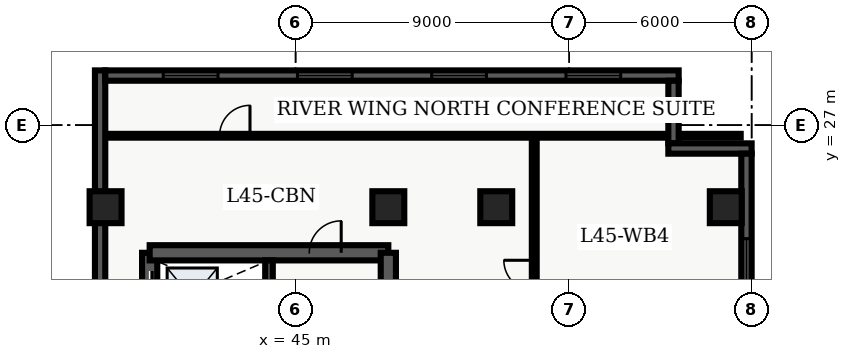
"""IFC4 building model, lengths in metres.
Left out: names, types, materials, properties, quantities, classifications, styles, units other than length and angle.
Written with IfcOpenShell. Run it as: python <this file> out.ifc"""

import sys

from ifc_helpers import new_model, entity, si_unit, converted_unit, direction, frame, origin_with_axes, origin_2d_with_axis, place, context, subcontext, project, spatial, polyline, rectangle, outline, extrude, element, fill, save


model = new_model("IFC4")
c1 = context("Model", 3, precision=1e-05, world=origin_with_axes(), true_north=direction((0.0, 1.0)))
c2 = subcontext(c1, "Body", "Model", "MODEL_VIEW")
j1 = project(units=[si_unit("LENGTHUNIT", "METRE"), converted_unit("PLANEANGLEUNIT", "DEGREE", entity("IfcPlaneAngleMeasure", 0.017), si_unit("PLANEANGLEUNIT", "RADIAN"), dimensions=[0, 0, 0, 0, 0, 0, 0])], contexts=[c1])
p1 = place(None, origin_with_axes())
s1 = spatial("IfcSite", under=j1, at=p1, CompositionType="ELEMENT")
p2 = place(p1, origin_with_axes())
s2 = spatial("IfcBuilding", under=s1, at=p2, CompositionType="ELEMENT")
p3 = place(p2, frame((0.0, 0.0, 183.6), z_axis=(0.0, 0.0, 1.0), x_axis=(1.0, 0.0, 0.0)))
s3 = spatial("IfcBuildingStorey", under=s2, at=p3, CompositionType="ELEMENT", Elevation=183.6)
p4 = place(p3, frame((40.2, 7.2, 0.0), z_axis=(0.0, 0.0, 1.0), x_axis=(0.0, 1.0, 0.0)))
e1 = element("IfcWall", 1, at=p4, inside=s3, PredefinedType="SHEAR", context=c2, shape_type="SweptSolid", body=[
    extrude(outline(polyline([(0.0, -0.25), (15.6, -0.25), (15.6, 0.25), (0.0, 0.25), (0.0, -0.25)])), origin_with_axes(), (0.0, 0.0, 1.0), 3.6),
])
p5 = place(p4, frame((14.475, 0.0, 0.0), z_axis=(0.0, 0.0, 1.0), x_axis=(1.0, 0.0, 0.0)))
e2 = element("IfcOpeningElement", 2, at=p5, cuts=e1, PredefinedType="OPENING", context=c2, shape_type="SweptSolid", body=[
    extrude(rectangle(XDim=1.05, YDim=0.52, at=origin_2d_with_axis()), origin_with_axes(), (0.0, 0.0, 1.0), 2.15),
])
p6 = place(p4, frame((12.75, 0.0, 0.0), z_axis=(0.0, 0.0, 1.0), x_axis=(1.0, 0.0, 0.0)))
e3 = element("IfcOpeningElement", 3, at=p6, cuts=e1, PredefinedType="OPENING", context=c2, shape_type="SweptSolid", body=[
    extrude(rectangle(XDim=1.2, YDim=0.52, at=origin_2d_with_axis()), origin_with_axes(), (0.0, 0.0, 1.0), 2.15),
])
p7 = place(p4, frame((9.3, 0.0, 0.0), z_axis=(0.0, 0.0, 1.0), x_axis=(1.0, 0.0, 0.0)))
e4 = element("IfcOpeningElement", 4, at=p7, cuts=e1, PredefinedType="OPENING", context=c2, shape_type="SweptSolid", body=[
    extrude(rectangle(XDim=0.9, YDim=0.52, at=origin_2d_with_axis()), origin_with_axes(), (0.0, 0.0, 1.0), 2.15),
])
p8 = place(p3, frame((40.2, 22.8, 0.0), z_axis=(0.0, 0.0, 1.0), x_axis=(1.0, 0.0, 0.0)))
e5 = element("IfcWall", 5, at=p8, inside=s3, PredefinedType="SHEAR", context=c2, shape_type="SweptSolid", body=[
    extrude(outline(polyline([(0.0, -0.25), (7.85, -0.25), (7.85, 0.25), (0.0, 0.25), (0.0, -0.25)])), origin_with_axes(), (0.0, 0.0, 1.0), 3.6),
])
p9 = place(p8, frame((5.775, 0.0, 0.0), z_axis=(0.0, 0.0, 1.0), x_axis=(1.0, 0.0, 0.0)))
e6 = element("IfcOpeningElement", 6, at=p9, cuts=e5, PredefinedType="OPENING", context=c2, shape_type="SweptSolid", body=[
    extrude(rectangle(XDim=1.05, YDim=0.52, at=origin_2d_with_axis()), origin_with_axes(), (0.0, 0.0, 1.0), 2.15),
])
p10 = place(p3, frame((48.05, 7.2, 0.0), z_axis=(0.0, 0.0, 1.0), x_axis=(0.0, 1.0, 0.0)))
e7 = element("IfcWall", 7, at=p10, inside=s3, PredefinedType="SHEAR", context=c2, shape_type="SweptSolid", body=[
    extrude(outline(polyline([(0.0, -0.25), (15.6, -0.25), (15.6, 0.25), (0.0, 0.25), (0.0, -0.25)])), origin_with_axes(), (0.0, 0.0, 1.0), 3.6),
])
p11 = place(p10, frame((5.975, 0.0, 0.0), z_axis=(0.0, 0.0, 1.0), x_axis=(1.0, 0.0, 0.0)))
e8 = element("IfcOpeningElement", 8, at=p11, cuts=e7, PredefinedType="OPENING", context=c2, shape_type="SweptSolid", body=[
    extrude(rectangle(XDim=1.05, YDim=0.52, at=origin_2d_with_axis()), origin_with_axes(), (0.0, 0.0, 1.0), 2.15),
])
p12 = place(p10, frame((2.725, 0.0, 0.0), z_axis=(0.0, 0.0, 1.0), x_axis=(1.0, 0.0, 0.0)))
e9 = element("IfcOpeningElement", 9, at=p12, cuts=e7, PredefinedType="OPENING", context=c2, shape_type="SweptSolid", body=[
    extrude(rectangle(XDim=0.95, YDim=0.52, at=origin_2d_with_axis()), origin_with_axes(), (0.0, 0.0, 1.0), 2.15),
])
p13 = place(p3, frame((44.125, 7.45, 0.0), z_axis=(0.0, 0.0, 1.0), x_axis=(0.0, 1.0, 0.0)))
e10 = element("IfcWall", 10, at=p13, inside=s3, PredefinedType="SHEAR", context=c2, shape_type="SweptSolid", body=[
    extrude(outline(polyline([(0.0, -0.125), (15.1, -0.125), (15.1, 0.125), (0.0, 0.125), (0.0, -0.125)])), origin_with_axes(), (0.0, 0.0, 1.0), 3.6),
])
for number, where, z_axis, x_axis in (
    (11, (38.75, 24.3, 0.0), (0.0, 0.0, 1.0), (1.0, 0.0, 0.0)),
    (12, (48.05, 24.3, 0.0), (0.0, 0.0, 1.0), (1.0, 0.0, 0.0)),
    (13, (51.6, 24.3, 0.0), (0.0, 0.0, 1.0), (1.0, 0.0, 0.0)),
    (14, (59.15, 24.3, 0.0), (0.0, 0.0, 1.0), (1.0, 0.0, 0.0)),
):
    element("IfcColumn", number, at=place(p3, frame(where, z_axis=z_axis, x_axis=x_axis)), inside=s3, PredefinedType="COLUMN", context=c2, shape_type="SweptSolid", body=[
        extrude(rectangle(XDim=1.05, YDim=1.05, at=origin_2d_with_axis()), origin_with_axes(), (0.0, 0.0, 1.0), 3.9),
    ])
p14 = place(p3, frame((52.85, 7.85, 0.0), z_axis=(0.0, 0.0, 1.0), x_axis=(0.0, 1.0, 0.0)))
e15 = element("IfcWall", 15, at=p14, inside=s3, PredefinedType="PARTITIONING", context=c2, shape_type="SweptSolid", body=[
    extrude(outline(polyline([(0.0, -0.08), (18.8, -0.08), (18.8, 0.08), (0.0, 0.08), (0.0, -0.08)])), origin_with_axes(), (0.0, 0.0, 1.0), 2.64),
])
p15 = place(p14, frame((0.684, 0.0, 0.0), z_axis=(0.0, 0.0, 1.0), x_axis=(1.0, 0.0, 0.0)))
e16 = element("IfcOpeningElement", 16, at=p15, cuts=e15, PredefinedType="OPENING", context=c2, shape_type="SweptSolid", body=[
    extrude(rectangle(XDim=0.9, YDim=0.18, at=origin_2d_with_axis()), origin_with_axes(), (0.0, 0.0, 1.0), 2.15),
])
p16 = place(p14, frame((5.907, 0.0, 0.0), z_axis=(0.0, 0.0, 1.0), x_axis=(1.0, 0.0, 0.0)))
e17 = element("IfcOpeningElement", 17, at=p16, cuts=e15, PredefinedType="OPENING", context=c2, shape_type="SweptSolid", body=[
    extrude(rectangle(XDim=1.0, YDim=0.18, at=origin_2d_with_axis()), origin_with_axes(), (0.0, 0.0, 1.0), 2.15),
])
p17 = place(p14, frame((11.368, 0.0, 0.0), z_axis=(0.0, 0.0, 1.0), x_axis=(1.0, 0.0, 0.0)))
e18 = element("IfcOpeningElement", 18, at=p17, cuts=e15, PredefinedType="OPENING", context=c2, shape_type="SweptSolid", body=[
    extrude(rectangle(XDim=1.0, YDim=0.18, at=origin_2d_with_axis()), origin_with_axes(), (0.0, 0.0, 1.0), 2.15),
])
p18 = place(p14, frame((14.204, 0.0, 0.0), z_axis=(0.0, 0.0, 1.0), x_axis=(1.0, 0.0, 0.0)))
e19 = element("IfcOpeningElement", 19, at=p18, cuts=e15, PredefinedType="OPENING", context=c2, shape_type="SweptSolid", body=[
    extrude(rectangle(XDim=1.0, YDim=0.18, at=origin_2d_with_axis()), origin_with_axes(), (0.0, 0.0, 1.0), 2.15),
])
p19 = place(p3, frame((38.735, 26.65, 0.0), z_axis=(0.0, 0.0, 1.0), x_axis=(1.0, 0.0, 0.0)))
e20 = element("IfcWall", 20, at=p19, inside=s3, PredefinedType="PARTITIONING", context=c2, shape_type="SweptSolid", body=[
    extrude(outline(polyline([(0.0, -0.062), (20.905, -0.062), (20.905, 0.062), (0.0, 0.062), (0.0, -0.062)])), origin_with_axes(), (0.0, 0.0, 1.0), 2.64),
])
p20 = place(p19, frame((4.265, 0.0, 0.0), z_axis=(0.0, 0.0, 1.0), x_axis=(1.0, 0.0, 0.0)))
e21 = element("IfcOpeningElement", 21, at=p20, cuts=e20, PredefinedType="OPENING", context=c2, shape_type="SweptSolid", body=[
    extrude(rectangle(XDim=1.0, YDim=0.145, at=origin_2d_with_axis()), origin_with_axes(), (0.0, 0.0, 1.0), 2.15),
])
p21 = place(p3, frame((38.57, 21.26, 0.0), z_axis=(0.0, 0.0, 1.0), x_axis=(0.0, 1.0, 0.0)))
e22 = element("IfcWall", 22, at=p21, inside=s3, PredefinedType="SOLIDWALL", context=c2, shape_type="SweptSolid", body=[
    extrude(outline(polyline([(0.0, -0.17), (7.54, -0.17), (7.54, 0.17), (0.0, 0.17), (0.0, -0.17)])), origin_with_axes(), (0.0, 0.0, 1.0), 3.6),
])
p22 = place(p3, frame((38.74, 28.63, 0.0), z_axis=(0.0, 0.0, 1.0), x_axis=(1.0, 0.0, 0.0)))
e23 = element("IfcWall", 23, at=p22, inside=s3, PredefinedType="SOLIDWALL", context=c2, shape_type="SweptSolid", body=[
    extrude(outline(polyline([(0.0, -0.17), (18.86, -0.17), (18.86, 0.17), (0.0, 0.17), (0.0, -0.17)])), origin_with_axes(), (0.0, 0.0, 1.0), 3.6),
])
p23 = place(p22, frame((2.808, 0.0, 0.45), z_axis=(0.0, 0.0, 1.0), x_axis=(1.0, 0.0, 0.0)))
e24 = element("IfcOpeningElement", 24, at=p23, cuts=e23, PredefinedType="OPENING", context=c2, shape_type="SweptSolid", body=[
    extrude(rectangle(XDim=1.8, YDim=0.36, at=origin_2d_with_axis()), origin_with_axes(), (0.0, 0.0, 1.0), 2.1),
])
p24 = place(p22, frame((7.222, 0.0, 0.45), z_axis=(0.0, 0.0, 1.0), x_axis=(1.0, 0.0, 0.0)))
e25 = element("IfcOpeningElement", 25, at=p24, cuts=e23, PredefinedType="OPENING", context=c2, shape_type="SweptSolid", body=[
    extrude(rectangle(XDim=1.8, YDim=0.36, at=origin_2d_with_axis()), origin_with_axes(), (0.0, 0.0, 1.0), 2.1),
])
p25 = place(p22, frame((11.637, 0.0, 0.45), z_axis=(0.0, 0.0, 1.0), x_axis=(1.0, 0.0, 0.0)))
e26 = element("IfcOpeningElement", 26, at=p25, cuts=e23, PredefinedType="OPENING", context=c2, shape_type="SweptSolid", body=[
    extrude(rectangle(XDim=1.8, YDim=0.36, at=origin_2d_with_axis()), origin_with_axes(), (0.0, 0.0, 1.0), 2.1),
])
p26 = place(p22, frame((16.053, 0.0, 0.45), z_axis=(0.0, 0.0, 1.0), x_axis=(1.0, 0.0, 0.0)))
e27 = element("IfcOpeningElement", 27, at=p26, cuts=e23, PredefinedType="OPENING", context=c2, shape_type="SweptSolid", body=[
    extrude(rectangle(XDim=1.8, YDim=0.36, at=origin_2d_with_axis()), origin_with_axes(), (0.0, 0.0, 1.0), 2.1),
])
p27 = place(p3, frame((57.43, 28.46, 0.0), z_axis=(0.0, 0.0, 1.0), x_axis=(0.0, -1.0, 0.0)))
e28 = element("IfcWall", 28, at=p27, inside=s3, PredefinedType="SOLIDWALL", context=c2, shape_type="SweptSolid", body=[
    extrude(outline(polyline([(0.0, -0.17), (2.06, -0.17), (2.06, 0.17), (0.0, 0.17), (0.0, -0.17)])), origin_with_axes(), (0.0, 0.0, 1.0), 3.6),
])
p28 = place(p3, frame((57.26, 26.23, 0.0), z_axis=(0.0, 0.0, 1.0), x_axis=(1.0, 0.0, 0.0)))
e29 = element("IfcWall", 29, at=p28, inside=s3, PredefinedType="SOLIDWALL", context=c2, shape_type="SweptSolid", body=[
    extrude(outline(polyline([(0.0, -0.17), (2.74, -0.17), (2.74, 0.17), (0.0, 0.17), (0.0, -0.17)])), origin_with_axes(), (0.0, 0.0, 1.0), 3.6),
])
p29 = place(p3, frame((59.83, 26.06, 0.0), z_axis=(0.0, 0.0, 1.0), x_axis=(0.0, -1.0, 0.0)))
e30 = element("IfcWall", 30, at=p29, inside=s3, PredefinedType="SOLIDWALL", context=c2, shape_type="SweptSolid", body=[
    extrude(outline(polyline([(0.0, -0.17), (23.66, -0.17), (23.66, 0.17), (0.0, 0.17), (0.0, -0.17)])), origin_with_axes(), (0.0, 0.0, 1.0), 3.6),
])
p30 = place(p29, frame((3.696, 0.0, 0.45), z_axis=(0.0, 0.0, 1.0), x_axis=(1.0, 0.0, 0.0)))
e31 = element("IfcOpeningElement", 31, at=p30, cuts=e30, PredefinedType="OPENING", context=c2, shape_type="SweptSolid", body=[
    extrude(rectangle(XDim=1.8, YDim=0.36, at=origin_2d_with_axis()), origin_with_axes(), (0.0, 0.0, 1.0), 2.1),
])
p31 = place(p29, frame((11.83, 0.0, 0.45), z_axis=(0.0, 0.0, 1.0), x_axis=(1.0, 0.0, 0.0)))
e32 = element("IfcOpeningElement", 32, at=p31, cuts=e30, PredefinedType="OPENING", context=c2, shape_type="SweptSolid", body=[
    extrude(rectangle(XDim=1.8, YDim=0.36, at=origin_2d_with_axis()), origin_with_axes(), (0.0, 0.0, 1.0), 2.1),
])
p32 = place(p29, frame((20.364, 0.0, 0.45), z_axis=(0.0, 0.0, 1.0), x_axis=(1.0, 0.0, 0.0)))
e33 = element("IfcOpeningElement", 33, at=p32, cuts=e30, PredefinedType="OPENING", context=c2, shape_type="SweptSolid", body=[
    extrude(rectangle(XDim=1.8, YDim=0.36, at=origin_2d_with_axis()), origin_with_axes(), (0.0, 0.0, 1.0), 2.1),
])
p33 = place(p4, frame((14.475, 0.0, 0.0), z_axis=(0.0, 0.0, 1.0), x_axis=(1.0, 0.0, 0.0)))
e34 = element("IfcDoor", 34, at=p33, inside=s3, OperationType="SLIDING_TO_RIGHT", PredefinedType="DOOR", context=c2, shape_type="SweptSolid", body=[
    extrude(rectangle(XDim=1.05, YDim=0.09, at=origin_2d_with_axis()), origin_with_axes(), (0.0, 0.0, 1.0), 2.15),
])
fill(e2, e34)
p34 = place(p8, frame((5.775, 0.0, 0.0), z_axis=(0.0, 0.0, 1.0), x_axis=(1.0, 0.0, 0.0)))
e35 = element("IfcDoor", 35, at=p34, inside=s3, OperationType="SINGLE_SWING_RIGHT", PredefinedType="DOOR", context=c2, shape_type="SweptSolid", body=[
    extrude(rectangle(XDim=1.05, YDim=0.09, at=origin_2d_with_axis()), origin_with_axes(), (0.0, 0.0, 1.0), 2.15),
])
fill(e6, e35)
p35 = place(p19, frame((4.265, 0.0, 0.0), z_axis=(0.0, 0.0, 1.0), x_axis=(1.0, 0.0, 0.0)))
e36 = element("IfcDoor", 36, at=p35, inside=s3, OperationType="SINGLE_SWING_RIGHT", PredefinedType="DOOR", context=c2, shape_type="SweptSolid", body=[
    extrude(rectangle(XDim=1.0, YDim=0.075, at=origin_2d_with_axis()), origin_with_axes(), (0.0, 0.0, 1.0), 2.15),
])
fill(e21, e36)
p36 = place(p14, frame((14.204, 0.0, 0.0), z_axis=(0.0, 0.0, 1.0), x_axis=(1.0, 0.0, 0.0)))
e37 = element("IfcDoor", 37, at=p36, inside=s3, OperationType="SINGLE_SWING_RIGHT", PredefinedType="DOOR", context=c2, shape_type="SweptSolid", body=[
    extrude(rectangle(XDim=1.0, YDim=0.09, at=origin_2d_with_axis()), origin_with_axes(), (0.0, 0.0, 1.0), 2.15),
])
fill(e19, e37)
p37 = place(p22, frame((2.808, 0.0, 0.45), z_axis=(0.0, 0.0, 1.0), x_axis=(1.0, 0.0, 0.0)))
e38 = element("IfcWindow", 38, at=p37, inside=s3, PredefinedType="WINDOW", context=c2, shape_type="SweptSolid", body=[
    extrude(rectangle(XDim=1.8, YDim=0.09, at=origin_2d_with_axis()), origin_with_axes(), (0.0, 0.0, 1.0), 2.1),
])
fill(e24, e38)
p38 = place(p22, frame((7.222, 0.0, 0.45), z_axis=(0.0, 0.0, 1.0), x_axis=(1.0, 0.0, 0.0)))
e39 = element("IfcWindow", 39, at=p38, inside=s3, PredefinedType="WINDOW", context=c2, shape_type="SweptSolid", body=[
    extrude(rectangle(XDim=1.8, YDim=0.09, at=origin_2d_with_axis()), origin_with_axes(), (0.0, 0.0, 1.0), 2.1),
])
fill(e25, e39)
p39 = place(p22, frame((11.637, 0.0, 0.45), z_axis=(0.0, 0.0, 1.0), x_axis=(1.0, 0.0, 0.0)))
e40 = element("IfcWindow", 40, at=p39, inside=s3, PredefinedType="WINDOW", context=c2, shape_type="SweptSolid", body=[
    extrude(rectangle(XDim=1.8, YDim=0.09, at=origin_2d_with_axis()), origin_with_axes(), (0.0, 0.0, 1.0), 2.1),
])
fill(e26, e40)
p40 = place(p22, frame((16.053, 0.0, 0.45), z_axis=(0.0, 0.0, 1.0), x_axis=(1.0, 0.0, 0.0)))
e41 = element("IfcWindow", 41, at=p40, inside=s3, PredefinedType="WINDOW", context=c2, shape_type="SweptSolid", body=[
    extrude(rectangle(XDim=1.8, YDim=0.09, at=origin_2d_with_axis()), origin_with_axes(), (0.0, 0.0, 1.0), 2.1),
])
fill(e27, e41)
p41 = place(p29, frame((3.696, 0.0, 0.45), z_axis=(0.0, 0.0, 1.0), x_axis=(1.0, 0.0, 0.0)))
e42 = element("IfcWindow", 42, at=p41, inside=s3, PredefinedType="WINDOW", context=c2, shape_type="SweptSolid", body=[
    extrude(rectangle(XDim=1.8, YDim=0.09, at=origin_2d_with_axis()), origin_with_axes(), (0.0, 0.0, 1.0), 2.1),
])
fill(e31, e42)
save(model, sys.argv[1])
